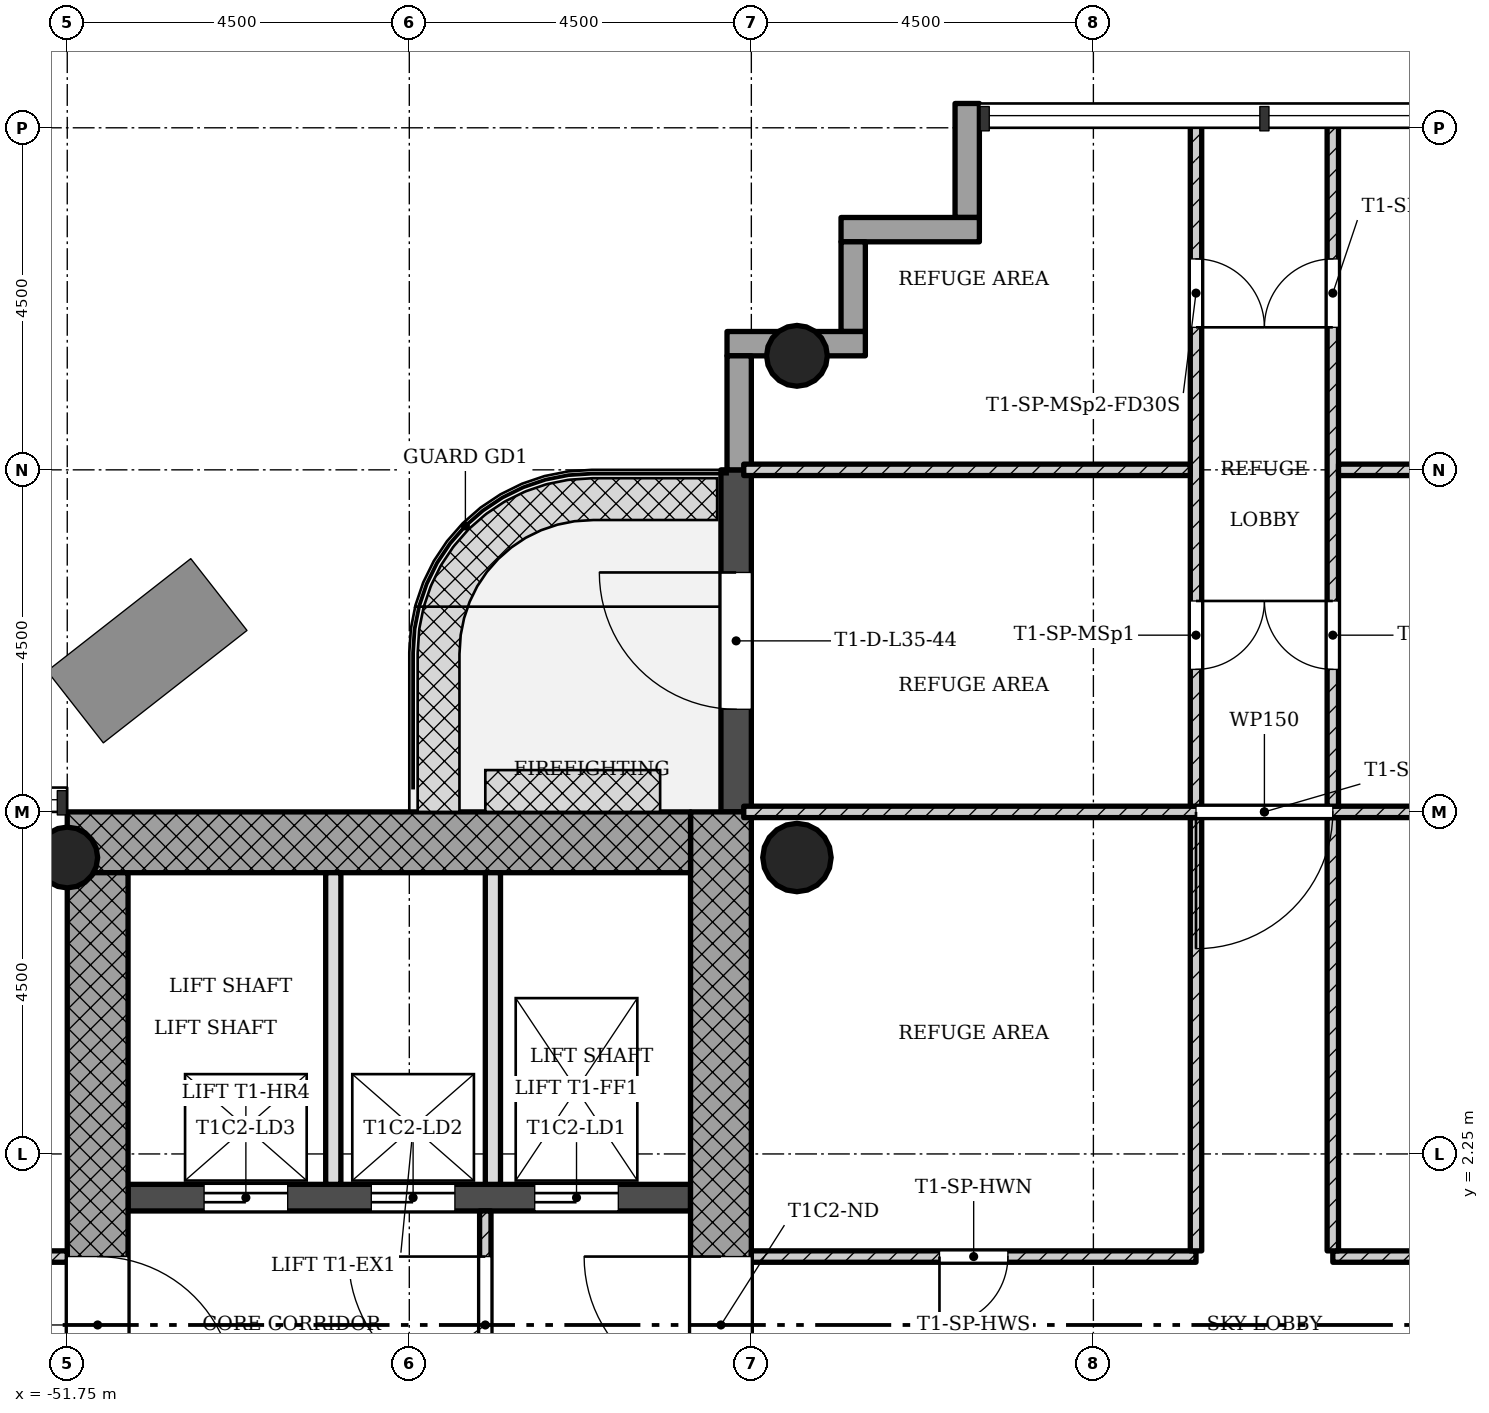
"""IFC4 building model, lengths in metres.
Left out: names, types, materials, properties, quantities, classifications, styles, units other than length and angle.
Written with IfcOpenShell. Run it as: python <this file> out.ifc"""

import sys

from ifc_helpers import new_model, si_unit, direction, frame, frame_2d, origin, origin_2d, place, context, subcontext, project, spatial, rectangle, hollow_circle, extrude, element, fill, save


model = new_model("IFC4")
c1 = context("Model", 3, precision=1e-05, world=origin(), true_north=direction((0.0, 1.0)))
c2 = subcontext(c1, "Body", "Model", "MODEL_VIEW")
j1 = project(units=[si_unit("LENGTHUNIT", "METRE"), si_unit("PLANEANGLEUNIT", "RADIAN")], contexts=[c1])
p1 = place(None, origin())
s1 = spatial("IfcSite", under=j1, at=p1, CompositionType="ELEMENT")
p2 = place(p1, origin())
s2 = spatial("IfcBuilding", under=s1, at=p2, CompositionType="ELEMENT")
p3 = place(p2, frame((0.0, 0.0, 128.7)))
s3 = spatial("IfcBuildingStorey", under=s2, at=p3, CompositionType="ELEMENT", Elevation=128.7)
p4 = place(p3, frame((-43.15, -5.95, 0.0), z_axis=(0.0, 0.0, 1.0), x_axis=(0.0, 1.0, 0.0)))
e1 = element("IfcWall", 1, at=p4, inside=s3, PredefinedType="SHEAR", context=c2, shape_type="SweptSolid", body=[
    extrude(rectangle(XDim=12.7, YDim=0.8, at=frame_2d((6.35, 0.0))), origin(), (0.0, 0.0, 1.0), 5.0),
])
p5 = place(p4, frame((5.05, 0.0, 0.0)))
e2 = element("IfcOpeningElement", 2, at=p5, cuts=e1, PredefinedType="OPENING", context=c2, shape_type="SweptSolid", body=[
    extrude(rectangle(XDim=1.8, YDim=2.1, at=frame_2d((0.9, 1.05))), frame((0.0, 0.41, 0.0), z_axis=(0.0, -1.0, 0.0), x_axis=(1.0, 0.0, 0.0)), (0.0, 0.0, 1.0), 0.82),
])
p6 = place(p3, frame((-43.55, 6.35, 0.0), z_axis=(0.0, 0.0, 1.0), x_axis=(-1.0, 0.0, 0.0)))
e3 = element("IfcWall", 3, at=p6, inside=s3, PredefinedType="SHEAR", context=c2, shape_type="SweptSolid", body=[
    extrude(rectangle(XDim=8.2, YDim=0.8, at=frame_2d((4.1, 0.0))), origin(), (0.0, 0.0, 1.0), 5.0),
])
p7 = place(p3, frame((-51.35, 5.95, 0.0), z_axis=(0.0, 0.0, 1.0), x_axis=(0.0, -1.0, 0.0)))
e4 = element("IfcWall", 4, at=p7, inside=s3, PredefinedType="SHEAR", context=c2, shape_type="SweptSolid", body=[
    extrude(rectangle(XDim=12.7, YDim=0.8, at=frame_2d((6.35, 0.0))), origin(), (0.0, 0.0, 1.0), 5.0),
])
p8 = place(p7, frame((5.05, 0.0, 0.0)))
e5 = element("IfcOpeningElement", 5, at=p8, cuts=e4, PredefinedType="OPENING", context=c2, shape_type="SweptSolid", body=[
    extrude(rectangle(XDim=1.8, YDim=2.1, at=frame_2d((0.9, 1.05))), frame((0.0, 0.41, 0.0), z_axis=(0.0, -1.0, 0.0), x_axis=(1.0, 0.0, 0.0)), (0.0, 0.0, 1.0), 0.82),
])
p9 = place(p3, frame((-50.95, 1.675, 0.0), z_axis=(0.0, 0.0, 1.0), x_axis=(1.0, 0.0, 0.0)))
e6 = element("IfcWall", 6, at=p9, inside=s3, PredefinedType="SHEAR", context=c2, shape_type="SweptSolid", body=[
    extrude(rectangle(XDim=7.4, YDim=0.35, at=frame_2d((3.7, 0.0))), origin(), (0.0, 0.0, 1.0), 5.0),
])
p10 = place(p9, frame((5.35, 0.0, 0.0)))
e7 = element("IfcOpeningElement", 7, at=p10, cuts=e6, PredefinedType="OPENING", context=c2, shape_type="SweptSolid", body=[
    extrude(rectangle(XDim=1.1, YDim=2.1, at=frame_2d((0.55, 1.05))), frame((0.0, 0.185, 0.0), z_axis=(0.0, -1.0, 0.0), x_axis=(1.0, 0.0, 0.0)), (0.0, 0.0, 1.0), 0.37),
])
p11 = place(p9, frame((3.2, 0.0, 0.0)))
e8 = element("IfcOpeningElement", 8, at=p11, cuts=e6, PredefinedType="OPENING", context=c2, shape_type="SweptSolid", body=[
    extrude(rectangle(XDim=1.1, YDim=2.1, at=frame_2d((0.55, 1.05))), frame((0.0, 0.185, 0.0), z_axis=(0.0, -1.0, 0.0), x_axis=(1.0, 0.0, 0.0)), (0.0, 0.0, 1.0), 0.37),
])
p12 = place(p9, frame((1.0, 0.0, 0.0)))
e9 = element("IfcOpeningElement", 9, at=p12, cuts=e6, PredefinedType="OPENING", context=c2, shape_type="SweptSolid", body=[
    extrude(rectangle(XDim=1.1, YDim=2.1, at=frame_2d((0.55, 1.05))), frame((0.0, 0.185, 0.0), z_axis=(0.0, -1.0, 0.0), x_axis=(1.0, 0.0, 0.0)), (0.0, 0.0, 1.0), 0.37),
])
for number, where, z_axis, x_axis in (
    (10, (-42.15, 12.75, 0.0), (0.0, 0.0, 1.0), (1.0, 0.0, 0.0)),
    (11, (-51.75, 6.15, 0.0), (0.0, 0.0, 1.0), (1.0, 0.0, 0.0)),
):
    element("IfcColumn", number, at=place(p3, frame(where, z_axis=z_axis, x_axis=x_axis)), inside=s3, PredefinedType="COLUMN", context=c2, shape_type="SweptSolid", body=[
        extrude(hollow_circle(Radius=0.4, WallThickness=0.028, at=origin_2d()), origin(), (0.0, 0.0, 1.0), 5.0),
    ])
p13 = place(p3, frame((-42.15, 6.15, 0.0), z_axis=(0.0, 0.0, 1.0), x_axis=(1.0, 0.0, 0.0)))
e12 = element("IfcColumn", 12, at=p13, inside=s3, PredefinedType="COLUMN", context=c2, shape_type="SweptSolid", body=[
    extrude(hollow_circle(Radius=0.45, WallThickness=0.032, at=origin_2d()), origin(), (0.0, 0.0, 1.0), 5.0),
])
p14 = place(p3, frame((-39.91, 16.07, -0.3), z_axis=(0.0, 0.0, 1.0), x_axis=(0.0, -1.0, 0.0)))
e13 = element("IfcWall", 13, at=p14, inside=s3, PredefinedType="STANDARD", context=c2, shape_type="SweptSolid", body=[
    extrude(rectangle(XDim=1.5, YDim=0.32, at=frame_2d((0.75, 0.0))), origin(), (0.0, 0.0, 1.0), 5.0),
])
p15 = place(p3, frame((-39.75, 14.41, -0.3), z_axis=(0.0, 0.0, 1.0), x_axis=(-1.0, 0.0, 0.0)))
e14 = element("IfcWall", 14, at=p15, inside=s3, PredefinedType="STANDARD", context=c2, shape_type="SweptSolid", body=[
    extrude(rectangle(XDim=1.82, YDim=0.32, at=frame_2d((0.91, 0.0))), origin(), (0.0, 0.0, 1.0), 5.0),
])
p16 = place(p3, frame((-41.41, 14.25, -0.3), z_axis=(0.0, 0.0, 1.0), x_axis=(0.0, -1.0, 0.0)))
e15 = element("IfcWall", 15, at=p16, inside=s3, PredefinedType="STANDARD", context=c2, shape_type="SweptSolid", body=[
    extrude(rectangle(XDim=1.18, YDim=0.32, at=frame_2d((0.59, 0.0))), origin(), (0.0, 0.0, 1.0), 5.0),
])
p17 = place(p3, frame((-41.25, 12.91, -0.3), z_axis=(0.0, 0.0, 1.0), x_axis=(-1.0, 0.0, 0.0)))
e16 = element("IfcWall", 16, at=p17, inside=s3, PredefinedType="STANDARD", context=c2, shape_type="SweptSolid", body=[
    extrude(rectangle(XDim=1.82, YDim=0.32, at=frame_2d((0.91, 0.0))), origin(), (0.0, 0.0, 1.0), 5.0),
])
p18 = place(p3, frame((-42.91, 12.75, -0.3), z_axis=(0.0, 0.0, 1.0), x_axis=(0.0, -1.0, 0.0)))
e17 = element("IfcWall", 17, at=p18, inside=s3, PredefinedType="STANDARD", context=c2, shape_type="SweptSolid", body=[
    extrude(rectangle(XDim=1.5, YDim=0.32, at=frame_2d((0.75, 0.0))), origin(), (0.0, 0.0, 1.0), 5.0),
])
p19 = place(p3, frame((-42.95, 11.25, -0.02), z_axis=(0.0, 0.0, 1.0), x_axis=(0.0, -1.0, 0.0)))
e18 = element("IfcWall", 18, at=p19, inside=s3, PredefinedType="STANDARD", context=c2, shape_type="SweptSolid", body=[
    extrude(rectangle(XDim=4.5, YDim=0.4, at=frame_2d((2.25, 0.0))), origin(), (0.0, 0.0, 1.0), 4.72),
])
p20 = place(p19, frame((1.35, 0.0, 0.02)))
e19 = element("IfcOpeningElement", 19, at=p20, cuts=e18, PredefinedType="OPENING", context=c2, shape_type="SweptSolid", body=[
    extrude(rectangle(XDim=1.8, YDim=2.1, at=frame_2d((0.9, 1.05))), frame((0.0, 0.21, 0.0), z_axis=(0.0, -1.0, 0.0), x_axis=(1.0, 0.0, 0.0)), (0.0, 0.0, 1.0), 0.42),
])
p21 = place(p3, frame((-46.25, 1.5, 0.0), z_axis=(0.0, 0.0, 1.0), x_axis=(0.0, -1.0, 0.0)))
e20 = element("IfcWall", 20, at=p21, inside=s3, PredefinedType="PARTITIONING", context=c2, shape_type="SweptSolid", body=[
    extrude(rectangle(XDim=3.0, YDim=0.15, at=frame_2d((1.5, 0.0))), origin(), (0.0, 0.0, 1.0), 4.58),
])
p22 = place(p21, frame((0.6, 0.0, 0.0)))
e21 = element("IfcOpeningElement", 21, at=p22, cuts=e20, PredefinedType="OPENING", context=c2, shape_type="SweptSolid", body=[
    extrude(rectangle(XDim=1.8, YDim=2.1, at=frame_2d((0.9, 1.05))), frame((0.0, 0.085, 0.0), z_axis=(0.0, -1.0, 0.0), x_axis=(1.0, 0.0, 0.0)), (0.0, 0.0, 1.0), 0.17),
])
for number, where, z_axis, x_axis in (
    (22, (-46.15, 5.95, 0.0), (0.0, 0.0, 1.0), (0.0, -1.0, 0.0)),
    (23, (-48.25, 5.95, 0.0), (0.0, 0.0, 1.0), (0.0, -1.0, 0.0)),
):
    element("IfcWall", number, at=place(p3, frame(where, z_axis=z_axis, x_axis=x_axis)), inside=s3, PredefinedType="SOLIDWALL", context=c2, shape_type="SweptSolid", body=[
        extrude(rectangle(XDim=4.1, YDim=0.2, at=frame_2d((2.05, 0.0))), origin(), (0.0, 0.0, 1.0), 4.58),
    ])
p23 = place(p3, frame((-35.1, 0.9, 0.0), z_axis=(0.0, 0.0, 1.0), x_axis=(1.0, 0.0, 0.0)))
e24 = element("IfcWall", 24, at=p23, inside=s3, PredefinedType="PARTITIONING", context=c2, shape_type="SweptSolid", body=[
    extrude(rectangle(XDim=5.85, YDim=0.15, at=frame_2d((2.925, 0.0))), origin(), (0.0, 0.0, 1.0), 4.58),
])
p24 = place(p23, frame((2.475, 0.0, 0.0)))
e25 = element("IfcOpeningElement", 25, at=p24, cuts=e24, PredefinedType="OPENING", context=c2, shape_type="SweptSolid", body=[
    extrude(rectangle(XDim=0.9, YDim=2.1, at=frame_2d((0.45, 1.05))), frame((0.0, 0.085, 0.0), z_axis=(0.0, -1.0, 0.0), x_axis=(1.0, 0.0, 0.0)), (0.0, 0.0, 1.0), 0.17),
])
p25 = place(p3, frame((-35.1, 0.975, 0.0), z_axis=(0.0, 0.0, 1.0), x_axis=(0.0, 1.0, 0.0)))
e26 = element("IfcWall", 26, at=p25, inside=s3, PredefinedType="PARTITIONING", context=c2, shape_type="SweptSolid", body=[
    extrude(rectangle(XDim=5.7, YDim=0.15, at=frame_2d((2.85, 0.0))), origin(), (0.0, 0.0, 1.0), 4.58),
])
p26 = place(p3, frame((-42.75, 0.9, 0.0), z_axis=(0.0, 0.0, 1.0), x_axis=(1.0, 0.0, 0.0)))
e27 = element("IfcWall", 27, at=p26, inside=s3, PredefinedType="PARTITIONING", context=c2, shape_type="SweptSolid", body=[
    extrude(rectangle(XDim=5.85, YDim=0.15, at=frame_2d((2.925, 0.0))), origin(), (0.0, 0.0, 1.0), 4.58),
])
p27 = place(p26, frame((2.475, 0.0, 0.0)))
e28 = element("IfcOpeningElement", 28, at=p27, cuts=e27, PredefinedType="OPENING", context=c2, shape_type="SweptSolid", body=[
    extrude(rectangle(XDim=0.9, YDim=2.1, at=frame_2d((0.45, 1.05))), frame((0.0, 0.085, 0.0), z_axis=(0.0, -1.0, 0.0), x_axis=(1.0, 0.0, 0.0)), (0.0, 0.0, 1.0), 0.17),
])
p28 = place(p3, frame((-36.9, 0.975, 0.0), z_axis=(0.0, 0.0, 1.0), x_axis=(0.0, 1.0, 0.0)))
e29 = element("IfcWall", 29, at=p28, inside=s3, PredefinedType="PARTITIONING", context=c2, shape_type="SweptSolid", body=[
    extrude(rectangle(XDim=5.7, YDim=0.15, at=frame_2d((2.85, 0.0))), origin(), (0.0, 0.0, 1.0), 4.58),
])
p29 = place(p3, frame((-60.85, 0.9, 0.0), z_axis=(0.0, 0.0, 1.0), x_axis=(1.0, 0.0, 0.0)))
e30 = element("IfcWall", 30, at=p29, inside=s3, PredefinedType="PARTITIONING", context=c2, shape_type="SweptSolid", body=[
    extrude(rectangle(XDim=9.1, YDim=0.15, at=frame_2d((4.55, 0.0))), origin(), (0.0, 0.0, 1.0), 4.58),
])
p30 = place(p29, frame((1.9, 0.0, 0.0)))
e31 = element("IfcOpeningElement", 31, at=p30, cuts=e30, PredefinedType="OPENING", context=c2, shape_type="SweptSolid", body=[
    extrude(rectangle(XDim=0.9, YDim=2.1, at=frame_2d((0.45, 1.05))), frame((0.0, 0.085, 0.0), z_axis=(0.0, -1.0, 0.0), x_axis=(1.0, 0.0, 0.0)), (0.0, 0.0, 1.0), 0.17),
])
p31 = place(p29, frame((6.4, 0.0, 0.0)))
e32 = element("IfcOpeningElement", 32, at=p31, cuts=e30, PredefinedType="OPENING", context=c2, shape_type="SweptSolid", body=[
    extrude(rectangle(XDim=0.9, YDim=2.1, at=frame_2d((0.45, 1.05))), frame((0.0, 0.085, 0.0), z_axis=(0.0, -1.0, 0.0), x_axis=(1.0, 0.0, 0.0)), (0.0, 0.0, 1.0), 0.17),
])
p32 = place(p3, frame((-42.85, 6.75, 0.0), z_axis=(0.0, 0.0, 1.0), x_axis=(1.0, 0.0, 0.0)))
e33 = element("IfcWall", 33, at=p32, inside=s3, PredefinedType="PARTITIONING", context=c2, shape_type="SweptSolid", body=[
    extrude(rectangle(XDim=13.7, YDim=0.15, at=frame_2d((6.85, 0.0))), origin(), (0.0, 0.0, 1.0), 4.58),
])
p33 = place(p32, frame((5.95, 0.0, 0.0)))
e34 = element("IfcOpeningElement", 34, at=p33, cuts=e33, PredefinedType="OPENING", context=c2, shape_type="SweptSolid", body=[
    extrude(rectangle(XDim=1.8, YDim=2.1, at=frame_2d((0.9, 1.05))), frame((0.0, 0.085, 0.0), z_axis=(0.0, -1.0, 0.0), x_axis=(1.0, 0.0, 0.0)), (0.0, 0.0, 1.0), 0.17),
])
p34 = place(p3, frame((-35.1, 6.825, 0.0), z_axis=(0.0, 0.0, 1.0), x_axis=(0.0, 1.0, 0.0)))
e35 = element("IfcWall", 35, at=p34, inside=s3, PredefinedType="PARTITIONING", context=c2, shape_type="SweptSolid", body=[
    extrude(rectangle(XDim=9.025, YDim=0.15, at=frame_2d((4.513, 0.0))), origin(), (0.0, 0.0, 1.0), 4.58),
])
p35 = place(p34, frame((1.8, 0.0, 0.0)))
e36 = element("IfcOpeningElement", 36, at=p35, cuts=e35, PredefinedType="OPENING", context=c2, shape_type="SweptSolid", body=[
    extrude(rectangle(XDim=0.9, YDim=2.1, at=frame_2d((0.45, 1.05))), frame((0.0, 0.085, 0.0), z_axis=(0.0, -1.0, 0.0), x_axis=(1.0, 0.0, 0.0)), (0.0, 0.0, 1.0), 0.17),
])
p36 = place(p34, frame((6.3, 0.0, 0.0)))
e37 = element("IfcOpeningElement", 37, at=p36, cuts=e35, PredefinedType="OPENING", context=c2, shape_type="SweptSolid", body=[
    extrude(rectangle(XDim=0.9, YDim=2.1, at=frame_2d((0.45, 1.05))), frame((0.0, 0.085, 0.0), z_axis=(0.0, -1.0, 0.0), x_axis=(1.0, 0.0, 0.0)), (0.0, 0.0, 1.0), 0.17),
])
p37 = place(p3, frame((-35.025, 11.25, 0.0), z_axis=(0.0, 0.0, 1.0), x_axis=(1.0, 0.0, 0.0)))
e38 = element("IfcWall", 38, at=p37, inside=s3, PredefinedType="PARTITIONING", context=c2, shape_type="SweptSolid", body=[
    extrude(rectangle(XDim=5.875, YDim=0.15, at=frame_2d((2.938, 0.0))), origin(), (0.0, 0.0, 1.0), 4.58),
])
p38 = place(p3, frame((-36.9, 6.825, 0.0), z_axis=(0.0, 0.0, 1.0), x_axis=(0.0, 1.0, 0.0)))
e39 = element("IfcWall", 39, at=p38, inside=s3, PredefinedType="PARTITIONING", context=c2, shape_type="SweptSolid", body=[
    extrude(rectangle(XDim=9.025, YDim=0.15, at=frame_2d((4.513, 0.0))), origin(), (0.0, 0.0, 1.0), 4.58),
])
p39 = place(p38, frame((1.8, 0.0, 0.0)))
e40 = element("IfcOpeningElement", 40, at=p39, cuts=e39, PredefinedType="OPENING", context=c2, shape_type="SweptSolid", body=[
    extrude(rectangle(XDim=0.9, YDim=2.1, at=frame_2d((0.45, 1.05))), frame((0.0, 0.085, 0.0), z_axis=(0.0, -1.0, 0.0), x_axis=(1.0, 0.0, 0.0)), (0.0, 0.0, 1.0), 0.17),
])
p40 = place(p38, frame((6.3, 0.0, 0.0)))
e41 = element("IfcOpeningElement", 41, at=p40, cuts=e39, PredefinedType="OPENING", context=c2, shape_type="SweptSolid", body=[
    extrude(rectangle(XDim=0.9, YDim=2.1, at=frame_2d((0.45, 1.05))), frame((0.0, 0.085, 0.0), z_axis=(0.0, -1.0, 0.0), x_axis=(1.0, 0.0, 0.0)), (0.0, 0.0, 1.0), 0.17),
])
p41 = place(p3, frame((-36.975, 11.25, 0.0), z_axis=(0.0, 0.0, 1.0), x_axis=(-1.0, 0.0, 0.0)))
e42 = element("IfcWall", 42, at=p41, inside=s3, PredefinedType="PARTITIONING", context=c2, shape_type="SweptSolid", body=[
    extrude(rectangle(XDim=5.875, YDim=0.15, at=frame_2d((2.938, 0.0))), origin(), (0.0, 0.0, 1.0), 4.58),
])
p42 = place(p20, origin())
e43 = element("IfcDoor", 43, at=p42, inside=s3, OperationType="SINGLE_SWING_LEFT", PredefinedType="DOOR", context=c2, shape_type="SweptSolid", body=[
    extrude(rectangle(XDim=1.8, YDim=2.1, at=frame_2d((0.9, 1.05))), frame((0.0, 0.025, 0.0), z_axis=(0.0, -1.0, 0.0), x_axis=(1.0, 0.0, 0.0)), (0.0, 0.0, 1.0), 0.05),
])
fill(e19, e43)
p43 = place(p22, origin())
e44 = element("IfcDoor", 44, at=p43, inside=s3, OperationType="SINGLE_SWING_LEFT", PredefinedType="DOOR", context=c2, shape_type="SweptSolid", body=[
    extrude(rectangle(XDim=1.8, YDim=2.1, at=frame_2d((0.9, 1.05))), frame((0.0, 0.025, 0.0), z_axis=(0.0, -1.0, 0.0), x_axis=(1.0, 0.0, 0.0)), (0.0, 0.0, 1.0), 0.05),
])
fill(e21, e44)
p44 = place(p27, origin())
e45 = element("IfcDoor", 45, at=p44, inside=s3, OperationType="SINGLE_SWING_LEFT", PredefinedType="DOOR", context=c2, shape_type="SweptSolid", body=[
    extrude(rectangle(XDim=0.9, YDim=2.1, at=frame_2d((0.45, 1.05))), frame((0.0, 0.025, 0.0), z_axis=(0.0, -1.0, 0.0), x_axis=(1.0, 0.0, 0.0)), (0.0, 0.0, 1.0), 0.05),
])
fill(e28, e45)
p45 = place(p33, origin())
e46 = element("IfcDoor", 46, at=p45, inside=s3, OperationType="SINGLE_SWING_LEFT", PredefinedType="DOOR", context=c2, shape_type="SweptSolid", body=[
    extrude(rectangle(XDim=1.8, YDim=2.1, at=frame_2d((0.9, 1.05))), frame((0.0, 0.025, 0.0), z_axis=(0.0, -1.0, 0.0), x_axis=(1.0, 0.0, 0.0)), (0.0, 0.0, 1.0), 0.05),
])
fill(e34, e46)
p46 = place(p35, origin())
e47 = element("IfcDoor", 47, at=p46, inside=s3, OperationType="SINGLE_SWING_LEFT", PredefinedType="DOOR", context=c2, shape_type="SweptSolid", body=[
    extrude(rectangle(XDim=0.9, YDim=2.1, at=frame_2d((0.45, 1.05))), frame((0.0, 0.025, 0.0), z_axis=(0.0, -1.0, 0.0), x_axis=(1.0, 0.0, 0.0)), (0.0, 0.0, 1.0), 0.05),
])
fill(e36, e47)
p47 = place(p36, origin())
e48 = element("IfcDoor", 48, at=p47, inside=s3, OperationType="SINGLE_SWING_RIGHT", PredefinedType="DOOR", context=c2, shape_type="SweptSolid", body=[
    extrude(rectangle(XDim=0.9, YDim=2.1, at=frame_2d((0.45, 1.05))), frame((0.0, 0.025, 0.0), z_axis=(0.0, -1.0, 0.0), x_axis=(1.0, 0.0, 0.0)), (0.0, 0.0, 1.0), 0.05),
])
fill(e37, e48)
p48 = place(p39, origin())
e49 = element("IfcDoor", 49, at=p48, inside=s3, OperationType="SINGLE_SWING_RIGHT", PredefinedType="DOOR", context=c2, shape_type="SweptSolid", body=[
    extrude(rectangle(XDim=0.9, YDim=2.1, at=frame_2d((0.45, 1.05))), frame((0.0, 0.025, 0.0), z_axis=(0.0, -1.0, 0.0), x_axis=(1.0, 0.0, 0.0)), (0.0, 0.0, 1.0), 0.05),
])
fill(e40, e49)
p49 = place(p40, origin())
e50 = element("IfcDoor", 50, at=p49, inside=s3, OperationType="SINGLE_SWING_LEFT", PredefinedType="DOOR", context=c2, shape_type="SweptSolid", body=[
    extrude(rectangle(XDim=0.9, YDim=2.1, at=frame_2d((0.45, 1.05))), frame((0.0, 0.025, 0.0), z_axis=(0.0, -1.0, 0.0), x_axis=(1.0, 0.0, 0.0)), (0.0, 0.0, 1.0), 0.05),
])
fill(e41, e50)
p50 = place(p10, origin())
e51 = element("IfcDoor", 51, at=p50, inside=s3, OperationType="SLIDING_TO_LEFT", PredefinedType="DOOR", context=c2, shape_type="SweptSolid", body=[
    extrude(rectangle(XDim=1.1, YDim=2.1, at=frame_2d((0.55, 1.05))), frame((0.0, 0.025, 0.0), z_axis=(0.0, -1.0, 0.0), x_axis=(1.0, 0.0, 0.0)), (0.0, 0.0, 1.0), 0.05),
])
fill(e7, e51)
p51 = place(p11, origin())
e52 = element("IfcDoor", 52, at=p51, inside=s3, OperationType="SLIDING_TO_LEFT", PredefinedType="DOOR", context=c2, shape_type="SweptSolid", body=[
    extrude(rectangle(XDim=1.1, YDim=2.1, at=frame_2d((0.55, 1.05))), frame((0.0, 0.025, 0.0), z_axis=(0.0, -1.0, 0.0), x_axis=(1.0, 0.0, 0.0)), (0.0, 0.0, 1.0), 0.05),
])
fill(e8, e52)
p52 = place(p12, origin())
e53 = element("IfcDoor", 53, at=p52, inside=s3, OperationType="SLIDING_TO_LEFT", PredefinedType="DOOR", context=c2, shape_type="SweptSolid", body=[
    extrude(rectangle(XDim=1.1, YDim=2.1, at=frame_2d((0.55, 1.05))), frame((0.0, 0.025, 0.0), z_axis=(0.0, -1.0, 0.0), x_axis=(1.0, 0.0, 0.0)), (0.0, 0.0, 1.0), 0.05),
])
fill(e9, e53)
p53 = place(p5, origin())
e54 = element("IfcDoor", 54, at=p53, inside=s3, OperationType="SINGLE_SWING_LEFT", PredefinedType="DOOR", context=c2, shape_type="SweptSolid", body=[
    extrude(rectangle(XDim=1.8, YDim=2.1, at=frame_2d((0.9, 1.05))), frame((0.0, 0.025, 0.0), z_axis=(0.0, -1.0, 0.0), x_axis=(1.0, 0.0, 0.0)), (0.0, 0.0, 1.0), 0.05),
])
fill(e2, e54)
p54 = place(p8, origin())
e55 = element("IfcDoor", 55, at=p54, inside=s3, OperationType="SINGLE_SWING_LEFT", PredefinedType="DOOR", context=c2, shape_type="SweptSolid", body=[
    extrude(rectangle(XDim=1.8, YDim=2.1, at=frame_2d((0.9, 1.05))), frame((0.0, 0.025, 0.0), z_axis=(0.0, -1.0, 0.0), x_axis=(1.0, 0.0, 0.0)), (0.0, 0.0, 1.0), 0.05),
])
fill(e5, e55)
save(model, sys.argv[1])
